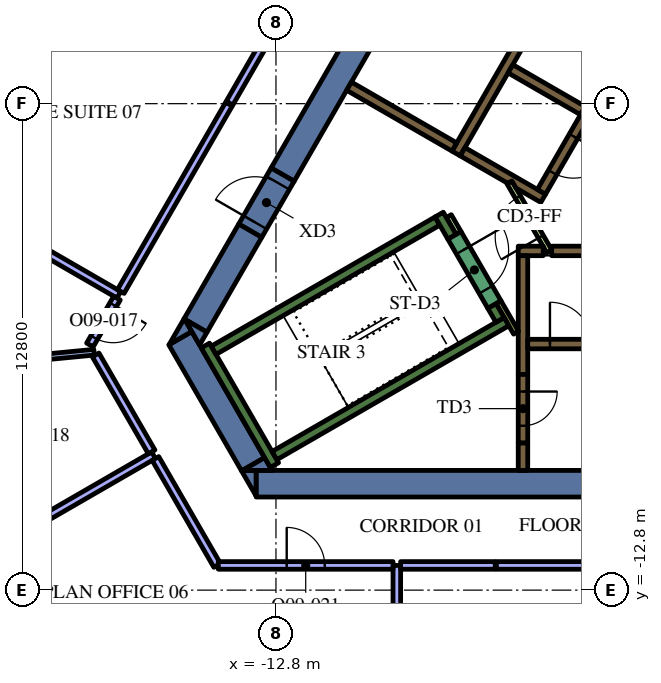
"""IFC4 building model, lengths in metres.
Left out: names, types, materials, properties, quantities, classifications, styles, units other than length and angle.
Written with IfcOpenShell. Run it as: python <this file> out.ifc"""

import sys

from ifc_helpers import new_model, si_unit, direction, frame, frame_2d, origin, place, context, subcontext, project, spatial, polyline, rectangle, outline, extrude, element, fill, save


model = new_model("IFC4")
c1 = context("Model", 3, precision=1e-05, world=origin(), true_north=direction((0.0, 1.0)))
c2 = subcontext(c1, "Body", "Model", "MODEL_VIEW")
j1 = project(units=[si_unit("LENGTHUNIT", "METRE"), si_unit("PLANEANGLEUNIT", "RADIAN")], contexts=[c1])
p1 = place(None, origin())
s1 = spatial("IfcSite", under=j1, at=p1, CompositionType="ELEMENT")
p2 = place(p1, origin())
s2 = spatial("IfcBuilding", under=s1, at=p2, CompositionType="ELEMENT")
p3 = place(p2, frame((0.0, 0.0, 247.8)))
s3 = spatial("IfcBuildingStorey", under=s2, at=p3, CompositionType="ELEMENT", Elevation=247.8)
p4 = place(p3, frame((8.904, -10.0, 0.0), z_axis=(0.0, 0.0, 1.0), x_axis=(-1.0, 0.0, 0.0)))
e1 = element("IfcWall", 1, at=p4, inside=s3, PredefinedType="SOLIDWALL", context=c2, shape_type="SweptSolid", body=[
    extrude(rectangle(XDim=22.226, YDim=0.7, at=frame_2d((11.113, 0.0))), origin(), (0.0, 0.0, 1.0), 4.2),
])
p5 = place(p3, origin())
e2 = element("IfcWall", 2, at=p5, inside=s3, PredefinedType="SOLIDWALL", context=c2, shape_type="SweptSolid", body=[
    extrude(outline(polyline([(-13.712, -9.65), (-13.324, -9.65), (-13.324, -10.322), (-13.712, -9.65)])), origin(), (0.0, 0.0, 1.0), 4.2),
])
p6 = place(p3, frame((-13.402, -9.487, 0.0), z_axis=(0.0, 0.0, 1.0), x_axis=(-0.500020498207, 0.866013568815, 0.0)))
e3 = element("IfcWall", 3, at=p6, inside=s3, PredefinedType="SOLIDWALL", context=c2, shape_type="SweptSolid", body=[
    extrude(rectangle(XDim=3.829, YDim=0.7, at=frame_2d((1.915, 0.0))), origin(), (0.0, 0.0, 1.0), 4.2),
])
e4 = element("IfcWall", 4, at=p5, inside=s3, PredefinedType="SOLIDWALL", context=c2, shape_type="SweptSolid", body=[
    extrude(outline(polyline([(-15.014, -5.995), (-15.611, -6.339), (-15.213, -5.65), (-15.014, -5.995)])), origin(), (0.0, 0.0, 1.0), 4.2),
])
e5 = element("IfcWall", 5, at=p5, inside=s3, PredefinedType="SOLIDWALL", context=c2, shape_type="SweptSolid", body=[
    extrude(outline(polyline([(-12.904, -9.65), (-13.68, -9.65), (-13.098, -9.314), (-12.904, -9.65)])), origin(), (0.0, 0.0, 1.0), 4.2),
])
p7 = place(p3, frame((-13.475, -3.339, 0.0), z_axis=(0.0, 0.0, 1.0), x_axis=(-0.500008214683, -0.866020660983, 0.0)))
e6 = element("IfcWall", 6, at=p7, inside=s3, PredefinedType="SOLIDWALL", context=c2, shape_type="SweptSolid", body=[
    extrude(rectangle(XDim=2.884, YDim=0.7, at=frame_2d((1.442, 0.0))), origin(), (0.0, 0.0, 1.0), 4.2),
])
e7 = element("IfcWall", 7, at=p5, inside=s3, PredefinedType="SOLIDWALL", context=c2, shape_type="SweptSolid", body=[
    extrude(outline(polyline([(-14.809, -6.35), (-15.197, -5.678), (-14.615, -6.014), (-14.809, -6.35)])), origin(), (0.0, 0.0, 1.0), 4.2),
])
p8 = place(p3, frame((-12.625, -1.867, 0.0), z_axis=(0.0, 0.0, 1.0), x_axis=(0.499996974394, 0.866027150612, 0.0)))
e8 = element("IfcWall", 8, at=p8, inside=s3, PredefinedType="SOLIDWALL", context=c2, shape_type="SweptSolid", body=[
    extrude(rectangle(XDim=15.858, YDim=0.7, at=frame_2d((7.929, 0.0))), origin(), (0.0, 0.0, 1.0), 4.2),
])
p9 = place(p3, frame((-12.84, -9.511, 0.0), z_axis=(0.0, 0.0, 1.0), x_axis=(-0.499997733992, 0.866026712061, 0.0)))
e9 = element("IfcWall", 9, at=p9, inside=s3, PredefinedType="SOLIDWALL", context=c2, shape_type="SweptSolid", body=[
    extrude(rectangle(XDim=3.634, YDim=0.25, at=frame_2d((1.817, 0.0))), origin(), (0.0, 0.0, 1.0), 4.2),
])
p10 = place(p3, frame((-14.44, -6.49, 0.0), z_axis=(0.0, 0.0, 1.0), x_axis=(0.866022966069, 0.500004222222, 0.0)))
e10 = element("IfcWall", 10, at=p10, inside=s3, PredefinedType="SOLIDWALL", context=c2, shape_type="SweptSolid", body=[
    extrude(rectangle(XDim=6.8, YDim=0.25, at=frame_2d((3.4, 0.0))), origin(), (0.0, 0.0, 1.0), 4.2),
])
p11 = place(p3, frame((-8.168, -3.503, 0.0), z_axis=(0.0, 0.0, 1.0), x_axis=(-0.499952099219, 0.866053057547, 0.0)))
e11 = element("IfcWall", 11, at=p11, inside=s3, PredefinedType="SOLIDWALL", context=c2, shape_type="SweptSolid", body=[
    extrude(rectangle(XDim=0.675, YDim=0.25, at=frame_2d((0.337, 0.0))), origin(), (0.0, 0.0, 1.0), 4.2),
])
p12 = place(p3, frame((-12.84, -9.261, 0.0), z_axis=(0.0, 0.0, 1.0), x_axis=(0.866016039709, 0.500016218704, 0.0)))
e12 = element("IfcWall", 12, at=p12, inside=s3, PredefinedType="SOLIDWALL", context=c2, shape_type="SweptSolid", body=[
    extrude(rectangle(XDim=7.05, YDim=0.25, at=frame_2d((3.525, 0.0))), origin(), (0.0, 0.0, 1.0), 4.2),
])
p13 = place(p3, frame((-6.905, -5.69, 0.0), z_axis=(0.0, 0.0, 1.0), x_axis=(-0.500402024738, 0.865793170242, 0.0)))
e13 = element("IfcWall", 13, at=p13, inside=s3, PredefinedType="SOLIDWALL", context=c2, shape_type="SweptSolid", body=[
    extrude(rectangle(XDim=0.425, YDim=0.25, at=frame_2d((0.212, 0.0))), origin(), (0.0, 0.0, 1.0), 4.2),
])
p14 = place(p3, frame((-6.3, -8.925, 0.0), z_axis=(0.0, 0.0, 1.0), x_axis=(0.0, -1.0, 0.0)))
e14 = element("IfcWall", 14, at=p14, inside=s3, PredefinedType="SOLIDWALL", context=c2, shape_type="SweptSolid", body=[
    extrude(rectangle(XDim=0.725, YDim=0.25, at=frame_2d((0.363, 0.0))), origin(), (0.0, 0.0, 1.0), 4.2),
])
p15 = place(p3, frame((-5.545, -3.875, 0.0), z_axis=(0.0, 0.0, 1.0), x_axis=(1.0, 0.0, 0.0)))
e15 = element("IfcWall", 15, at=p15, inside=s3, PredefinedType="SOLIDWALL", context=c2, shape_type="SweptSolid", body=[
    extrude(rectangle(XDim=11.97, YDim=0.25, at=frame_2d((5.985, 0.0))), origin(), (0.0, 0.0, 1.0), 4.2),
])
p16 = place(p3, frame((-6.425, -3.875, 0.0), z_axis=(0.0, 0.0, 1.0), x_axis=(1.0, 0.0, 0.0)))
e16 = element("IfcWall", 16, at=p16, inside=s3, PredefinedType="SOLIDWALL", context=c2, shape_type="SweptSolid", body=[
    extrude(rectangle(XDim=0.658, YDim=0.25, at=frame_2d((0.329, 0.0))), origin(), (0.0, 0.0, 1.0), 4.2),
])
p17 = place(p3, frame((-6.3, -7.125, 0.0), z_axis=(0.0, 0.0, 1.0), x_axis=(0.0, 1.0, 0.0)))
e17 = element("IfcWall", 17, at=p17, inside=s3, PredefinedType="SOLIDWALL", context=c2, shape_type="SweptSolid", body=[
    extrude(rectangle(XDim=3.125, YDim=0.25, at=frame_2d((1.562, 0.0))), origin(), (0.0, 0.0, 1.0), 4.2),
])
p18 = place(p3, frame((-8.06, -1.311, 0.0), z_axis=(0.0, 0.0, 1.0), x_axis=(0.50000273126, 0.866023826885, 0.0)))
e18 = element("IfcWall", 18, at=p18, inside=s3, PredefinedType="SOLIDWALL", context=c2, shape_type="SweptSolid", body=[
    extrude(rectangle(XDim=10.33, YDim=0.25, at=frame_2d((5.165, 0.0))), origin(), (0.0, 0.0, 1.0), 4.2),
])
p19 = place(p3, frame((-4.724, -0.182, 0.0), z_axis=(0.0, 0.0, 1.0), x_axis=(-0.866008176907, 0.50002983664, 0.0)))
e19 = element("IfcWall", 19, at=p19, inside=s3, PredefinedType="SOLIDWALL", context=c2, shape_type="SweptSolid", body=[
    extrude(rectangle(XDim=2.2, YDim=0.25, at=frame_2d((1.1, 0.0))), origin(), (0.0, 0.0, 1.0), 4.2),
])
e20 = element("IfcWall", 20, at=p5, inside=s3, PredefinedType="SOLIDWALL", context=c2, shape_type="SweptSolid", body=[
    extrude(outline(polyline([(-5.922, -2.257), (-5.922, -2.257), (-5.705, -2.382), (-5.83, -2.598), (-6.483, -2.221), (-6.591, -2.033), (-6.591, -2.033), (-6.7, -2.096), (-7.952, -1.373), (-7.827, -1.156), (-5.922, -2.257)])), origin(), (0.0, 0.0, 1.0), 4.2),
])
p20 = place(p3, frame((-8.106, -1.14, 0.0), z_axis=(0.0, 0.0, 1.0), x_axis=(-0.866008981251, 0.500028443584, 0.0)))
e21 = element("IfcWall", 21, at=p20, inside=s3, PredefinedType="SOLIDWALL", context=c2, shape_type="SweptSolid", body=[
    extrude(rectangle(XDim=3.2, YDim=0.25, at=frame_2d((1.6, 0.0))), origin(), (0.0, 0.0, 1.0), 4.2),
])
p21 = place(p3, frame((-8.252, -2.958, 0.0), z_axis=(0.0, 0.0, 1.0), x_axis=(0.500174715838, -0.865924508047, 0.0)))
e22 = element("IfcWall", 22, at=p21, inside=s3, PredefinedType="PARTITIONING", context=c2, shape_type="SweptSolid", body=[
    extrude(rectangle(XDim=0.514, YDim=0.15, at=frame_2d((0.257, 0.0))), origin(), (0.0, 0.0, 1.0), 3.45),
])
p22 = place(p3, frame((-6.48, -6.027, 0.0), z_axis=(0.0, 0.0, 1.0), x_axis=(-0.499927229454, 0.866067413802, 0.0)))
e23 = element("IfcWall", 23, at=p22, inside=s3, PredefinedType="PARTITIONING", context=c2, shape_type="SweptSolid", body=[
    extrude(rectangle(XDim=0.929, YDim=0.15, at=frame_2d((0.464, 0.0))), origin(), (0.0, 0.0, 1.0), 4.2),
])
p23 = place(p3, frame((-6.175, -6.325, 0.0), z_axis=(0.0, 0.0, 1.0), x_axis=(1.0, 0.0, 0.0)))
e24 = element("IfcWall", 24, at=p23, inside=s3, PredefinedType="SOLIDWALL", context=c2, shape_type="SweptSolid", body=[
    extrude(rectangle(XDim=12.35, YDim=0.25, at=frame_2d((6.175, 0.0))), origin(), (0.0, 0.0, 1.0), 4.2),
])
p24 = place(p23, frame((0.585, 0.0, 0.0)))
e25 = element("IfcOpeningElement", 25, at=p24, cuts=e24, PredefinedType="OPENING", context=c2, shape_type="SweptSolid", body=[
    extrude(rectangle(XDim=1.1, YDim=2.1, at=frame_2d((0.55, 1.05))), frame((0.0, 0.135, 0.0), z_axis=(0.0, -1.0, 0.0), x_axis=(1.0, 0.0, 0.0)), (0.0, 0.0, 1.0), 0.27),
])
p25 = place(p23, frame((3.105, 0.0, 0.0)))
e26 = element("IfcOpeningElement", 26, at=p25, cuts=e24, PredefinedType="OPENING", context=c2, shape_type="SweptSolid", body=[
    extrude(rectangle(XDim=1.1, YDim=2.1, at=frame_2d((0.55, 1.05))), frame((0.0, 0.135, 0.0), z_axis=(0.0, -1.0, 0.0), x_axis=(1.0, 0.0, 0.0)), (0.0, 0.0, 1.0), 0.27),
])
p26 = place(p23, frame((5.625, 0.0, 0.0)))
e27 = element("IfcOpeningElement", 27, at=p26, cuts=e24, PredefinedType="OPENING", context=c2, shape_type="SweptSolid", body=[
    extrude(rectangle(XDim=1.1, YDim=2.1, at=frame_2d((0.55, 1.05))), frame((0.0, 0.135, 0.0), z_axis=(0.0, -1.0, 0.0), x_axis=(1.0, 0.0, 0.0)), (0.0, 0.0, 1.0), 0.27),
])
p27 = place(p23, frame((8.145, 0.0, 0.0)))
e28 = element("IfcOpeningElement", 28, at=p27, cuts=e24, PredefinedType="OPENING", context=c2, shape_type="SweptSolid", body=[
    extrude(rectangle(XDim=1.1, YDim=2.1, at=frame_2d((0.55, 1.05))), frame((0.0, 0.135, 0.0), z_axis=(0.0, -1.0, 0.0), x_axis=(1.0, 0.0, 0.0)), (0.0, 0.0, 1.0), 0.27),
])
p28 = place(p23, frame((10.665, 0.0, 0.0)))
e29 = element("IfcOpeningElement", 29, at=p28, cuts=e24, PredefinedType="OPENING", context=c2, shape_type="SweptSolid", body=[
    extrude(rectangle(XDim=1.1, YDim=2.1, at=frame_2d((0.55, 1.05))), frame((0.0, 0.135, 0.0), z_axis=(0.0, -1.0, 0.0), x_axis=(1.0, 0.0, 0.0)), (0.0, 0.0, 1.0), 0.27),
])
p29 = place(p3, frame((-0.898, 6.194, 0.0), z_axis=(0.0, 0.0, 1.0), x_axis=(-0.499996202215, -0.866027596426, 0.0)))
e30 = element("IfcWall", 30, at=p29, inside=s3, PredefinedType="SOLIDWALL", context=c2, shape_type="SweptSolid", body=[
    extrude(rectangle(XDim=9.83, YDim=0.25, at=frame_2d((4.915, 0.0))), origin(), (0.0, 0.0, 1.0), 4.2),
])
p30 = place(p29, frame((0.585, 0.0, 0.0)))
e31 = element("IfcOpeningElement", 31, at=p30, cuts=e30, PredefinedType="OPENING", context=c2, shape_type="SweptSolid", body=[
    extrude(rectangle(XDim=1.1, YDim=2.1, at=frame_2d((0.55, 1.05))), frame((0.0, 0.135, 0.0), z_axis=(0.0, -1.0, 0.0), x_axis=(1.0, 0.0, 0.0)), (0.0, 0.0, 1.0), 0.27),
])
p31 = place(p29, frame((3.105, 0.0, 0.0)))
e32 = element("IfcOpeningElement", 32, at=p31, cuts=e30, PredefinedType="OPENING", context=c2, shape_type="SweptSolid", body=[
    extrude(rectangle(XDim=1.1, YDim=2.1, at=frame_2d((0.55, 1.05))), frame((0.0, 0.135, 0.0), z_axis=(0.0, -1.0, 0.0), x_axis=(1.0, 0.0, 0.0)), (0.0, 0.0, 1.0), 0.27),
])
p32 = place(p29, frame((5.625, 0.0, 0.0)))
e33 = element("IfcOpeningElement", 33, at=p32, cuts=e30, PredefinedType="OPENING", context=c2, shape_type="SweptSolid", body=[
    extrude(rectangle(XDim=1.1, YDim=2.1, at=frame_2d((0.55, 1.05))), frame((0.0, 0.135, 0.0), z_axis=(0.0, -1.0, 0.0), x_axis=(1.0, 0.0, 0.0)), (0.0, 0.0, 1.0), 0.27),
])
p33 = place(p29, frame((8.145, 0.0, 0.0)))
e34 = element("IfcOpeningElement", 34, at=p33, cuts=e30, PredefinedType="OPENING", context=c2, shape_type="SweptSolid", body=[
    extrude(rectangle(XDim=1.1, YDim=2.1, at=frame_2d((0.55, 1.05))), frame((0.0, 0.135, 0.0), z_axis=(0.0, -1.0, 0.0), x_axis=(1.0, 0.0, 0.0)), (0.0, 0.0, 1.0), 0.27),
])
p34 = place(p3, frame((-8.103, -3.466, 0.0), z_axis=(0.0, 0.0, 1.0), x_axis=(0.500078061341, -0.865980330357, 0.0)))
e35 = element("IfcWall", 35, at=p34, inside=s3, PredefinedType="SOLIDWALL", context=c2, shape_type="SweptSolid", body=[
    extrude(rectangle(XDim=2.1, YDim=0.4, at=frame_2d((1.05, 0.0))), origin(), (0.0, 0.0, 1.0), 4.2),
])
p35 = place(p34, frame((0.45, 0.0, 0.0)))
e36 = element("IfcOpeningElement", 36, at=p35, cuts=e35, PredefinedType="OPENING", context=c2, shape_type="SweptSolid", body=[
    extrude(rectangle(XDim=1.2, YDim=2.1, at=frame_2d((0.6, 1.05))), frame((0.0, 0.21, 0.0), z_axis=(0.0, -1.0, 0.0), x_axis=(1.0, 0.0, 0.0)), (0.0, 0.0, 1.0), 0.42),
])
p36 = place(p3, frame((-6.3, -7.125, 0.0), z_axis=(0.0, 0.0, 1.0), x_axis=(0.0, -1.0, 0.0)))
e37 = element("IfcWall", 37, at=p36, inside=s3, PredefinedType="SOLIDWALL", context=c2, shape_type="SweptSolid", body=[
    extrude(rectangle(XDim=1.8, YDim=0.25, at=frame_2d((0.9, 0.0))), origin(), (0.0, 0.0, 1.0), 4.2),
])
p37 = place(p36, frame((0.45, 0.0, 0.0)))
e38 = element("IfcOpeningElement", 38, at=p37, cuts=e37, PredefinedType="OPENING", context=c2, shape_type="SweptSolid", body=[
    extrude(rectangle(XDim=0.9, YDim=2.1, at=frame_2d((0.45, 1.05))), frame((0.0, 0.135, 0.0), z_axis=(0.0, -1.0, 0.0), x_axis=(1.0, 0.0, 0.0)), (0.0, 0.0, 1.0), 0.27),
])
p38 = place(p3, frame((-5.606, -3.89, 0.0), z_axis=(0.0, 0.0, 1.0), x_axis=(-0.500027713859, 0.866009402589, 0.0)))
e39 = element("IfcWall", 39, at=p38, inside=s3, PredefinedType="PARTITIONING", context=c2, shape_type="SweptSolid", body=[
    extrude(rectangle(XDim=2.1, YDim=0.15, at=frame_2d((1.05, 0.0))), origin(), (0.0, 0.0, 1.0), 3.45),
])
p39 = place(p38, frame((0.45, 0.0, 0.0)))
e40 = element("IfcOpeningElement", 40, at=p39, cuts=e39, PredefinedType="OPENING", context=c2, shape_type="SweptSolid", body=[
    extrude(rectangle(XDim=1.2, YDim=2.1, at=frame_2d((0.6, 1.05))), frame((0.0, 0.085, 0.0), z_axis=(0.0, -1.0, 0.0), x_axis=(1.0, 0.0, 0.0)), (0.0, 0.0, 1.0), 0.17),
])
p40 = place(p3, frame((-13.475, -3.339, 0.0), z_axis=(0.0, 0.0, 1.0), x_axis=(0.499954529098, 0.86605165483, 0.0)))
e41 = element("IfcWall", 41, at=p40, inside=s3, PredefinedType="SOLIDWALL", context=c2, shape_type="SweptSolid", body=[
    extrude(rectangle(XDim=1.7, YDim=0.7, at=frame_2d((0.85, 0.0))), origin(), (0.0, 0.0, 1.0), 4.2),
])
p41 = place(p40, frame((0.25, 0.0, 0.0)))
e42 = element("IfcOpeningElement", 42, at=p41, cuts=e41, PredefinedType="OPENING", context=c2, shape_type="SweptSolid", body=[
    extrude(rectangle(XDim=1.2, YDim=2.1, at=frame_2d((0.6, 1.05))), frame((0.0, 0.36, 0.0), z_axis=(0.0, -1.0, 0.0), x_axis=(1.0, 0.0, 0.0)), (0.0, 0.0, 1.0), 0.72),
])
p42 = place(p3, frame((-9.62, -15.654, 0.0), z_axis=(0.0, 0.0, 1.0), x_axis=(0.0, 1.0, 0.0)))
e43 = element("IfcWall", 43, at=p42, inside=s3, PredefinedType="PARTITIONING", context=c2, shape_type="SweptSolid", body=[
    extrude(rectangle(XDim=3.504, YDim=0.2, at=frame_2d((1.752, 0.0))), origin(), (0.0, 0.0, 1.0), 3.45),
])
p43 = place(p3, frame((-7.0, -12.15, 0.0), z_axis=(0.0, 0.0, 1.0), x_axis=(1.0, 0.0, 0.0)))
e44 = element("IfcWall", 44, at=p43, inside=s3, PredefinedType="PARTITIONING", context=c2, shape_type="SweptSolid", body=[
    extrude(rectangle(XDim=14.0, YDim=0.2, at=frame_2d((7.0, 0.0))), origin(), (0.0, 0.0, 1.0), 3.45),
])
p44 = place(p43, frame((6.5, 0.0, 0.0)))
e45 = element("IfcOpeningElement", 45, at=p44, cuts=e44, PredefinedType="OPENING", context=c2, shape_type="SweptSolid", body=[
    extrude(rectangle(XDim=1.0, YDim=2.1, at=frame_2d((0.5, 1.05))), frame((0.0, 0.11, 0.0), z_axis=(0.0, -1.0, 0.0), x_axis=(1.0, 0.0, 0.0)), (0.0, 0.0, 1.0), 0.22),
])
p45 = place(p3, frame((-9.52, -12.15, 0.0), z_axis=(0.0, 0.0, 1.0), x_axis=(1.0, 0.0, 0.0)))
e46 = element("IfcWall", 46, at=p45, inside=s3, PredefinedType="PARTITIONING", context=c2, shape_type="SweptSolid", body=[
    extrude(rectangle(XDim=2.49, YDim=0.2, at=frame_2d((1.245, 0.0))), origin(), (0.0, 0.0, 1.0), 3.45),
])
p46 = place(p3, frame((-16.934, -5.03, 0.0), z_axis=(0.0, 0.0, 1.0), x_axis=(-0.866031916153, 0.499988720078, 0.0)))
e47 = element("IfcWall", 47, at=p46, inside=s3, PredefinedType="PARTITIONING", context=c2, shape_type="SweptSolid", body=[
    extrude(rectangle(XDim=3.492, YDim=0.2, at=frame_2d((1.746, 0.0))), origin(), (0.0, 0.0, 1.0), 3.45),
])
p47 = place(p3, frame((-7.364, 11.545, 0.0), z_axis=(0.0, 0.0, 1.0), x_axis=(-0.500001759768, -0.86602438778, 0.0)))
e48 = element("IfcWall", 48, at=p47, inside=s3, PredefinedType="PARTITIONING", context=c2, shape_type="SweptSolid", body=[
    extrude(rectangle(XDim=13.317, YDim=0.2, at=frame_2d((6.658, 0.0))), origin(), (0.0, 0.0, 1.0), 3.45),
])
p48 = place(p47, frame((6.2, 0.0, 0.0)))
e49 = element("IfcOpeningElement", 49, at=p48, cuts=e48, PredefinedType="OPENING", context=c2, shape_type="SweptSolid", body=[
    extrude(rectangle(XDim=1.0, YDim=2.1, at=frame_2d((0.5, 1.05))), frame((0.0, 0.11, 0.0), z_axis=(0.0, -1.0, 0.0), x_axis=(1.0, 0.0, 0.0)), (0.0, 0.0, 1.0), 0.22),
])
p49 = place(p3, frame((-14.037, -0.013, 0.0), z_axis=(0.0, 0.0, 1.0), x_axis=(-0.500018205831, -0.866014892388, 0.0)))
e50 = element("IfcWall", 50, at=p49, inside=s3, PredefinedType="PARTITIONING", context=c2, shape_type="SweptSolid", body=[
    extrude(rectangle(XDim=5.693, YDim=0.2, at=frame_2d((2.846, 0.0))), origin(), (0.0, 0.0, 1.0), 3.45),
])
p50 = place(p3, frame((-17.586, -6.54, 0.0), z_axis=(0.0, 0.0, 1.0), x_axis=(-0.995356357863, -0.096258614479, 0.0)))
e51 = element("IfcWall", 51, at=p50, inside=s3, PredefinedType="PARTITIONING", context=c2, shape_type="SweptSolid", body=[
    extrude(rectangle(XDim=3.926, YDim=0.15, at=frame_2d((1.963, 0.0))), origin(), (0.0, 0.0, 1.0), 3.45),
])
p51 = place(p50, frame((1.3, 0.0, 0.0)))
e52 = element("IfcOpeningElement", 52, at=p51, cuts=e51, PredefinedType="OPENING", context=c2, shape_type="SweptSolid", body=[
    extrude(rectangle(XDim=0.9, YDim=2.1, at=frame_2d((0.45, 1.05))), frame((0.0, 0.085, 0.0), z_axis=(0.0, -1.0, 0.0), x_axis=(1.0, 0.0, 0.0)), (0.0, 0.0, 1.0), 0.17),
])
p52 = place(p3, frame((-16.983, -5.116, 0.0), z_axis=(0.0, 0.0, 1.0), x_axis=(-0.500009219579, -0.866020080793, 0.0)))
e53 = element("IfcWall", 53, at=p52, inside=s3, PredefinedType="PARTITIONING", context=c2, shape_type="SweptSolid", body=[
    extrude(rectangle(XDim=1.425, YDim=0.2, at=frame_2d((0.712, 0.0))), origin(), (0.0, 0.0, 1.0), 3.45),
])
p53 = place(p52, frame((0.2, 0.0, 0.0)))
e54 = element("IfcOpeningElement", 54, at=p53, cuts=e53, PredefinedType="OPENING", context=c2, shape_type="SweptSolid", body=[
    extrude(rectangle(XDim=1.0, YDim=2.1, at=frame_2d((0.5, 1.05))), frame((0.0, 0.11, 0.0), z_axis=(0.0, -1.0, 0.0), x_axis=(1.0, 0.0, 0.0)), (0.0, 0.0, 1.0), 0.22),
])
p54 = place(p3, frame((-16.021, -9.25, 0.0), z_axis=(0.0, 0.0, 1.0), x_axis=(-0.86602692059, -0.499997372806, 0.0)))
e55 = element("IfcWall", 55, at=p54, inside=s3, PredefinedType="PARTITIONING", context=c2, shape_type="SweptSolid", body=[
    extrude(rectangle(XDim=6.765, YDim=0.2, at=frame_2d((3.382, 0.0))), origin(), (0.0, 0.0, 1.0), 3.45),
])
p55 = place(p3, frame((-17.545, -6.612, 0.0), z_axis=(0.0, 0.0, 1.0), x_axis=(0.500006981563, -0.86602137294, 0.0)))
e56 = element("IfcWall", 56, at=p55, inside=s3, PredefinedType="PARTITIONING", context=c2, shape_type="SweptSolid", body=[
    extrude(rectangle(XDim=2.946, YDim=0.2, at=frame_2d((1.473, 0.0))), origin(), (0.0, 0.0, 1.0), 3.45),
])
p56 = place(p3, frame((-15.971, -9.337, 0.0), z_axis=(0.0, 0.0, 1.0), x_axis=(0.500010870188, -0.866019127788, 0.0)))
e57 = element("IfcWall", 57, at=p56, inside=s3, PredefinedType="PARTITIONING", context=c2, shape_type="SweptSolid", body=[
    extrude(rectangle(XDim=3.249, YDim=0.2, at=frame_2d((1.624, 0.0))), origin(), (0.0, 0.0, 1.0), 3.45),
])
p57 = place(p3, frame((-14.317, -12.15, 0.0), z_axis=(0.0, 0.0, 1.0), x_axis=(1.0, 0.0, 0.0)))
e58 = element("IfcWall", 58, at=p57, inside=s3, PredefinedType="PARTITIONING", context=c2, shape_type="SweptSolid", body=[
    extrude(rectangle(XDim=4.597, YDim=0.2, at=frame_2d((2.299, 0.0))), origin(), (0.0, 0.0, 1.0), 3.45),
])
p58 = place(p57, frame((1.8, 0.0, 0.0)))
e59 = element("IfcOpeningElement", 59, at=p58, cuts=e58, PredefinedType="OPENING", context=c2, shape_type="SweptSolid", body=[
    extrude(rectangle(XDim=1.0, YDim=2.1, at=frame_2d((0.5, 1.05))), frame((0.0, 0.11, 0.0), z_axis=(0.0, -1.0, 0.0), x_axis=(1.0, 0.0, 0.0)), (0.0, 0.0, 1.0), 0.22),
])
p59 = place(p24, origin())
e60 = element("IfcDoor", 60, at=p59, inside=s3, OperationType="DOUBLE_DOOR_SLIDING", PredefinedType="DOOR", context=c2, shape_type="SweptSolid", body=[
    extrude(rectangle(XDim=1.1, YDim=2.1, at=frame_2d((0.55, 1.05))), frame((0.0, 0.025, 0.0), z_axis=(0.0, -1.0, 0.0), x_axis=(1.0, 0.0, 0.0)), (0.0, 0.0, 1.0), 0.05),
])
fill(e25, e60)
p60 = place(p33, origin())
e61 = element("IfcDoor", 61, at=p60, inside=s3, OperationType="DOUBLE_DOOR_SLIDING", PredefinedType="DOOR", context=c2, shape_type="SweptSolid", body=[
    extrude(rectangle(XDim=1.1, YDim=2.1, at=frame_2d((0.55, 1.05))), frame((0.0, 0.025, 0.0), z_axis=(0.0, -1.0, 0.0), x_axis=(1.0, 0.0, 0.0)), (0.0, 0.0, 1.0), 0.05),
])
fill(e34, e61)
p61 = place(p35, origin())
e62 = element("IfcDoor", 62, at=p61, inside=s3, OperationType="SINGLE_SWING_LEFT", PredefinedType="DOOR", context=c2, shape_type="SweptSolid", body=[
    extrude(rectangle(XDim=1.2, YDim=2.1, at=frame_2d((0.6, 1.05))), frame((0.0, 0.025, 0.0), z_axis=(0.0, -1.0, 0.0), x_axis=(1.0, 0.0, 0.0)), (0.0, 0.0, 1.0), 0.05),
])
fill(e36, e62)
p62 = place(p37, origin())
e63 = element("IfcDoor", 63, at=p62, inside=s3, OperationType="SINGLE_SWING_LEFT", PredefinedType="DOOR", context=c2, shape_type="SweptSolid", body=[
    extrude(rectangle(XDim=0.9, YDim=2.1, at=frame_2d((0.45, 1.05))), frame((0.0, 0.025, 0.0), z_axis=(0.0, -1.0, 0.0), x_axis=(1.0, 0.0, 0.0)), (0.0, 0.0, 1.0), 0.05),
])
fill(e38, e63)
p63 = place(p39, origin())
e64 = element("IfcDoor", 64, at=p63, inside=s3, OperationType="SINGLE_SWING_LEFT", PredefinedType="DOOR", context=c2, shape_type="SweptSolid", body=[
    extrude(rectangle(XDim=1.2, YDim=2.1, at=frame_2d((0.6, 1.05))), frame((0.0, 0.025, 0.0), z_axis=(0.0, -1.0, 0.0), x_axis=(1.0, 0.0, 0.0)), (0.0, 0.0, 1.0), 0.05),
])
fill(e40, e64)
p64 = place(p41, origin())
e65 = element("IfcDoor", 65, at=p64, inside=s3, OperationType="SINGLE_SWING_LEFT", PredefinedType="DOOR", context=c2, shape_type="SweptSolid", body=[
    extrude(rectangle(XDim=1.2, YDim=2.1, at=frame_2d((0.6, 1.05))), frame((0.0, 0.025, 0.0), z_axis=(0.0, -1.0, 0.0), x_axis=(1.0, 0.0, 0.0)), (0.0, 0.0, 1.0), 0.05),
])
fill(e42, e65)
p65 = place(p53, origin())
e66 = element("IfcDoor", 66, at=p65, inside=s3, OperationType="SINGLE_SWING_LEFT", PredefinedType="DOOR", context=c2, shape_type="SweptSolid", body=[
    extrude(rectangle(XDim=1.0, YDim=2.1, at=frame_2d((0.5, 1.05))), frame((0.0, 0.025, 0.0), z_axis=(0.0, -1.0, 0.0), x_axis=(1.0, 0.0, 0.0)), (0.0, 0.0, 1.0), 0.05),
])
fill(e54, e66)
p66 = place(p58, origin())
e67 = element("IfcDoor", 67, at=p66, inside=s3, OperationType="SINGLE_SWING_RIGHT", PredefinedType="DOOR", context=c2, shape_type="SweptSolid", body=[
    extrude(rectangle(XDim=1.0, YDim=2.1, at=frame_2d((0.5, 1.05))), frame((0.0, 0.025, 0.0), z_axis=(0.0, -1.0, 0.0), x_axis=(1.0, 0.0, 0.0)), (0.0, 0.0, 1.0), 0.05),
])
fill(e59, e67)
save(model, sys.argv[1])
